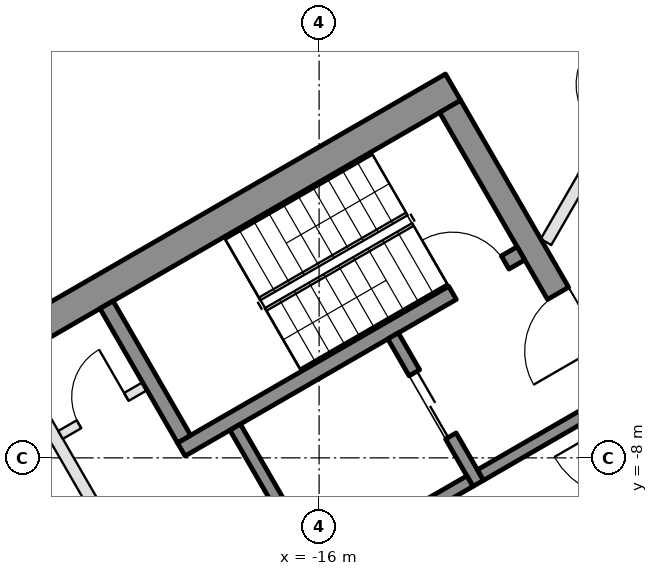
"""IFC4 building model, lengths in metres.
Left out: names, types, materials, properties, quantities, classifications, styles, units other than length and angle.
Written with IfcOpenShell. Run it as: python <this file> out.ifc"""

import sys

from ifc_helpers import new_model, si_unit, direction, frame, frame_2d, origin, place, context, subcontext, project, spatial, rectangle, extrude, element, fill, save


model = new_model("IFC4")
c1 = context("Model", 3, precision=1e-05, world=origin(), true_north=direction((0.0, 1.0)))
c2 = subcontext(c1, "Body", "Model", "MODEL_VIEW")
j1 = project(units=[si_unit("LENGTHUNIT", "METRE"), si_unit("PLANEANGLEUNIT", "RADIAN")], contexts=[c1])
p1 = place(None, origin())
s1 = spatial("IfcSite", under=j1, at=p1, CompositionType="ELEMENT")
p2 = place(p1, origin())
s2 = spatial("IfcBuilding", under=s1, at=p2, CompositionType="ELEMENT")
p3 = place(p2, frame((0.0, 0.0, 98.3)))
s3 = spatial("IfcBuildingStorey", under=s2, at=p3, CompositionType="ELEMENT", Elevation=98.3)
p4 = place(p3, frame((-20.309, 1.934, 0.0), z_axis=(0.0, 0.0, 1.0), x_axis=(-0.499992114976, -0.866029956157, 0.0)))
e1 = element("IfcWall", 1, at=p4, inside=s3, PredefinedType="SOLIDWALL", context=c2, shape_type="SweptSolid", body=[
    extrude(rectangle(XDim=6.74, YDim=0.35, at=frame_2d((3.37, 0.0))), origin(), (0.0, 0.0, 1.0), 3.55),
])
p5 = place(p4, frame((4.02, 0.0, 0.0)))
e2 = element("IfcOpeningElement", 2, at=p5, cuts=e1, PredefinedType="OPENING", context=c2, shape_type="SweptSolid", body=[
    extrude(rectangle(XDim=2.4, YDim=2.4, at=frame_2d((1.2, 1.2))), frame((0.0, 0.185, 0.0), z_axis=(0.0, -1.0, 0.0), x_axis=(1.0, 0.0, 0.0)), (0.0, 0.0, 1.0), 0.37),
])
p6 = place(p4, frame((0.77, 0.0, 0.3)))
e3 = element("IfcOpeningElement", 3, at=p6, cuts=e1, PredefinedType="OPENING", context=c2, shape_type="SweptSolid", body=[
    extrude(rectangle(XDim=2.9, YDim=2.65, at=frame_2d((1.45, 1.325))), frame((0.0, 0.185, 0.0), z_axis=(0.0, -1.0, 0.0), x_axis=(1.0, 0.0, 0.0)), (0.0, 0.0, 1.0), 0.37),
])
p7 = place(p3, frame((-13.797, -1.903, 0.0), z_axis=(0.0, 0.0, 1.0), x_axis=(-0.866025009528, -0.500000682871, 0.0)))
e4 = element("IfcWall", 4, at=p7, inside=s3, PredefinedType="SHEAR", context=c2, shape_type="SweptSolid", body=[
    extrude(rectangle(XDim=14.837, YDim=0.5, at=frame_2d((7.418, 0.0))), origin(), (0.0, 0.0, 1.0), 3.5),
])
p8 = place(p3, frame((-13.845, -2.22, 0.0), z_axis=(0.0, 0.0, 1.0), x_axis=(0.500004234368, -0.866022959057, 0.0)))
e5 = element("IfcWall", 5, at=p8, inside=s3, PredefinedType="SHEAR", context=c2, shape_type="SweptSolid", body=[
    extrude(rectangle(XDim=10.0, YDim=0.4, at=frame_2d((5.0, 0.0))), origin(), (0.0, 0.0, 1.0), 3.5),
])
p9 = place(p8, frame((3.55, 0.0, 0.0)))
e6 = element("IfcOpeningElement", 6, at=p9, cuts=e5, PredefinedType="OPENING", context=c2, shape_type="SweptSolid", body=[
    extrude(rectangle(XDim=1.1, YDim=2.1, at=frame_2d((0.55, 1.05))), frame((0.0, 0.21, 0.0), z_axis=(0.0, -1.0, 0.0), x_axis=(1.0, 0.0, 0.0)), (0.0, 0.0, 1.0), 0.42),
])
p10 = place(p8, frame((5.85, 0.0, 0.0)))
e7 = element("IfcOpeningElement", 7, at=p10, cuts=e5, PredefinedType="OPENING", context=c2, shape_type="SweptSolid", body=[
    extrude(rectangle(XDim=1.4, YDim=2.1, at=frame_2d((0.7, 1.05))), frame((0.0, 0.21, 0.0), z_axis=(0.0, -1.0, 0.0), x_axis=(1.0, 0.0, 0.0)), (0.0, 0.0, 1.0), 0.42),
])
p11 = place(p3, frame((-12.681, -4.636, 0.0), z_axis=(0.0, 0.0, 1.0), x_axis=(-0.866021702275, -0.500006411147, 0.0)))
e8 = element("IfcWall", 8, at=p11, inside=s3, PredefinedType="SHEAR", context=c2, shape_type="SweptSolid", body=[
    extrude(rectangle(XDim=6.45, YDim=0.25, at=frame_2d((3.225, 0.0))), origin(), (0.0, 0.0, 1.0), 3.5),
])
p12 = place(p11, frame((0.3, 0.0, 0.0)))
e9 = element("IfcOpeningElement", 9, at=p12, cuts=e8, PredefinedType="OPENING", context=c2, shape_type="SweptSolid", body=[
    extrude(rectangle(XDim=1.0, YDim=2.1, at=frame_2d((0.5, 1.05))), frame((0.0, 0.135, 0.0), z_axis=(0.0, -1.0, 0.0), x_axis=(1.0, 0.0, 0.0)), (0.0, 0.0, 1.0), 0.27),
])
p13 = place(p3, frame((-19.496, -5.482, 0.0), z_axis=(0.0, 0.0, 1.0), x_axis=(0.499990435942, -0.866030925526, 0.0)))
e10 = element("IfcWall", 10, at=p13, inside=s3, PredefinedType="SHEAR", context=c2, shape_type="SweptSolid", body=[
    extrude(rectangle(XDim=2.55, YDim=0.25, at=frame_2d((1.275, 0.0))), origin(), (0.0, 0.0, 1.0), 3.5),
])
p14 = place(p3, frame((-17.381, -7.495, 0.0), z_axis=(0.0, 0.0, 1.0), x_axis=(0.500011755427, -0.866018616679, 0.0)))
e11 = element("IfcWall", 11, at=p14, inside=s3, PredefinedType="SHEAR", context=c2, shape_type="SweptSolid", body=[
    extrude(rectangle(XDim=2.8, YDim=0.2, at=frame_2d((1.4, 0.0))), origin(), (0.0, 0.0, 1.0), 3.5),
])
p15 = place(p3, frame((-14.783, -5.995, 0.0), z_axis=(0.0, 0.0, 1.0), x_axis=(0.49994636267, -0.866056369097, 0.0)))
e12 = element("IfcWall", 12, at=p15, inside=s3, PredefinedType="SHEAR", context=c2, shape_type="SweptSolid", body=[
    extrude(rectangle(XDim=2.8, YDim=0.2, at=frame_2d((1.4, 0.0))), origin(), (0.0, 0.0, 1.0), 3.5),
])
p16 = place(p15, frame((0.7, 0.0, 0.0)))
e13 = element("IfcOpeningElement", 13, at=p16, cuts=e12, PredefinedType="OPENING", context=c2, shape_type="SweptSolid", body=[
    extrude(rectangle(XDim=1.2, YDim=2.1, at=frame_2d((0.6, 1.05))), frame((0.0, 0.11, 0.0), z_axis=(0.0, -1.0, 0.0), x_axis=(1.0, 0.0, 0.0)), (0.0, 0.0, 1.0), 0.22),
])
p17 = place(p3, frame((-13.52, -8.383, 0.0), z_axis=(0.0, 0.0, 1.0), x_axis=(-0.866034573852, -0.49998411664, 0.0)))
e14 = element("IfcWall", 14, at=p17, inside=s3, PredefinedType="SHEAR", context=c2, shape_type="SweptSolid", body=[
    extrude(rectangle(XDim=2.8, YDim=0.2, at=frame_2d((1.4, 0.0))), origin(), (0.0, 0.0, 1.0), 3.5),
])
p18 = place(p3, frame((-11.268, -7.083, 0.0), z_axis=(0.0, 0.0, 1.0), x_axis=(-0.866050077142, -0.499957262057, 0.0)))
e15 = element("IfcWall", 15, at=p18, inside=s3, PredefinedType="SHEAR", context=c2, shape_type="SweptSolid", body=[
    extrude(rectangle(XDim=2.4, YDim=0.2, at=frame_2d((1.2, 0.0))), origin(), (0.0, 0.0, 1.0), 3.5),
])
p19 = place(p3, frame((-21.076, -6.395, 0.0), z_axis=(0.0, 0.0, 1.0), x_axis=(0.50001468107, -0.866016927499, 0.0)))
e16 = element("IfcWall", 16, at=p19, inside=s3, PredefinedType="PARTITIONING", context=c2, shape_type="SweptSolid", body=[
    extrude(rectangle(XDim=5.4, YDim=0.2, at=frame_2d((2.7, 0.0))), origin(), (0.0, 0.0, 1.0), 3.5),
])
p20 = place(p19, frame((3.05, 0.0, 0.0)))
e17 = element("IfcOpeningElement", 17, at=p20, cuts=e16, PredefinedType="OPENING", context=c2, shape_type="SweptSolid", body=[
    extrude(rectangle(XDim=0.9, YDim=2.1, at=frame_2d((0.45, 1.05))), frame((0.0, 0.11, 0.0), z_axis=(0.0, -1.0, 0.0), x_axis=(1.0, 0.0, 0.0)), (0.0, 0.0, 1.0), 0.22),
])
p21 = place(p3, frame((-18.866, -6.822, 0.0), z_axis=(0.0, 0.0, 1.0), x_axis=(-0.866028054938, -0.499995408039, 0.0)))
e18 = element("IfcWall", 18, at=p21, inside=s3, PredefinedType="PARTITIONING", context=c2, shape_type="SweptSolid", body=[
    extrude(rectangle(XDim=1.6, YDim=0.15, at=frame_2d((0.8, 0.0))), origin(), (0.0, 0.0, 1.0), 3.5),
])
p22 = place(p21, frame((0.35, 0.0, 0.0)))
e19 = element("IfcOpeningElement", 19, at=p22, cuts=e18, PredefinedType="OPENING", context=c2, shape_type="SweptSolid", body=[
    extrude(rectangle(XDim=0.9, YDim=2.1, at=frame_2d((0.45, 1.05))), frame((0.0, 0.085, 0.0), z_axis=(0.0, -1.0, 0.0), x_axis=(1.0, 0.0, 0.0)), (0.0, 0.0, 1.0), 0.17),
])
p23 = place(p3, frame((-12.269, -4.45, 0.0), z_axis=(0.0, 0.0, 1.0), x_axis=(0.500015331954, 0.866016551696, 0.0)))
e20 = element("IfcWall", 20, at=p23, inside=s3, PredefinedType="PARTITIONING", context=c2, shape_type="SweptSolid", body=[
    extrude(rectangle(XDim=4.979, YDim=0.2, at=frame_2d((2.489, 0.0))), origin(), (0.0, 0.0, 1.0), 2.95),
])
p24 = place(p23, frame((1.99, 0.0, 0.0)))
e21 = element("IfcOpeningElement", 21, at=p24, cuts=e20, PredefinedType="OPENING", context=c2, shape_type="SweptSolid", body=[
    extrude(rectangle(XDim=1.0, YDim=2.1, at=frame_2d((0.5, 1.05))), frame((0.0, 0.11, 0.0), z_axis=(0.0, -1.0, 0.0), x_axis=(1.0, 0.0, 0.0)), (0.0, 0.0, 1.0), 0.22),
])
p25 = place(p16, origin())
e22 = element("IfcDoor", 22, at=p25, inside=s3, OperationType="DOUBLE_DOOR_SLIDING", PredefinedType="DOOR", context=c2, shape_type="SweptSolid", body=[
    extrude(rectangle(XDim=1.2, YDim=2.1, at=frame_2d((0.6, 1.05))), frame((0.0, 0.025, 0.0), z_axis=(0.0, -1.0, 0.0), x_axis=(1.0, 0.0, 0.0)), (0.0, 0.0, 1.0), 0.05),
])
fill(e13, e22)
p26 = place(p22, frame((0.9, 0.0, 0.0), z_axis=(0.0, 0.0, 1.0), x_axis=(-1.0, 0.0, 0.0)))
e23 = element("IfcDoor", 23, at=p26, inside=s3, OperationType="SINGLE_SWING_RIGHT", PredefinedType="DOOR", context=c2, shape_type="SweptSolid", body=[
    extrude(rectangle(XDim=0.9, YDim=2.1, at=frame_2d((0.45, 1.05))), frame((0.0, 0.025, 0.0), z_axis=(0.0, -1.0, 0.0), x_axis=(1.0, 0.0, 0.0)), (0.0, 0.0, 1.0), 0.05),
])
fill(e19, e23)
p27 = place(p9, frame((1.1, 0.0, 0.0), z_axis=(0.0, 0.0, 1.0), x_axis=(-1.0, 0.0, 0.0)))
e24 = element("IfcDoor", 24, at=p27, inside=s3, OperationType="SINGLE_SWING_LEFT", PredefinedType="DOOR", context=c2, shape_type="SweptSolid", body=[
    extrude(rectangle(XDim=1.1, YDim=2.1, at=frame_2d((0.55, 1.05))), frame((0.0, 0.025, 0.0), z_axis=(0.0, -1.0, 0.0), x_axis=(1.0, 0.0, 0.0)), (0.0, 0.0, 1.0), 0.05),
])
fill(e6, e24)
p28 = place(p12, frame((1.0, 0.0, 0.0), z_axis=(0.0, 0.0, 1.0), x_axis=(-1.0, 0.0, 0.0)))
e25 = element("IfcDoor", 25, at=p28, inside=s3, OperationType="SINGLE_SWING_LEFT", PredefinedType="DOOR", context=c2, shape_type="SweptSolid", body=[
    extrude(rectangle(XDim=1.0, YDim=2.1, at=frame_2d((0.5, 1.05))), frame((0.0, 0.025, 0.0), z_axis=(0.0, -1.0, 0.0), x_axis=(1.0, 0.0, 0.0)), (0.0, 0.0, 1.0), 0.05),
])
fill(e9, e25)
save(model, sys.argv[1])
